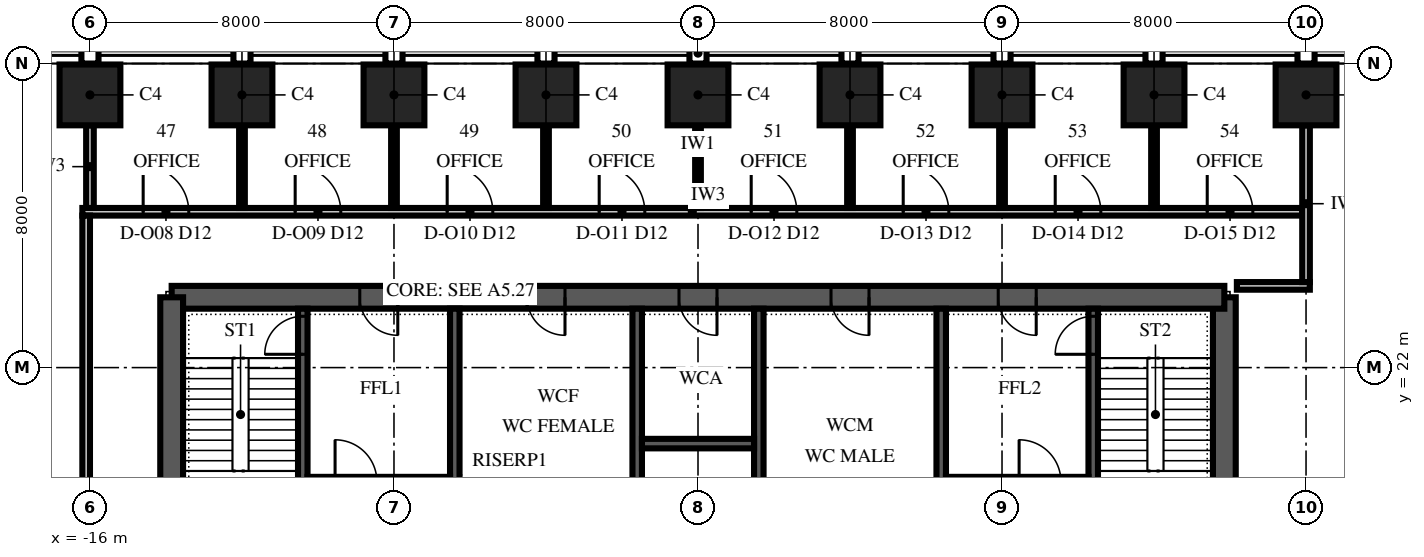
"""IFC4 building model, lengths in metres.
Left out: names, types, materials, properties, quantities, classifications, styles, units other than length and angle.
Written with IfcOpenShell. Run it as: python <this file> out.ifc"""

import sys

from ifc_helpers import new_model, si_unit, direction, frame, frame_2d, origin, origin_2d, place, context, subcontext, project, spatial, polyline, rectangle, outline, extrude, element, fill, save


model = new_model("IFC4")
c1 = context("Model", 3, precision=1e-05, world=origin(), true_north=direction((0.0, 1.0)))
c2 = subcontext(c1, "Body", "Model", "MODEL_VIEW")
j1 = project(units=[si_unit("LENGTHUNIT", "METRE"), si_unit("PLANEANGLEUNIT", "RADIAN")], contexts=[c1])
p1 = place(None, origin())
s1 = spatial("IfcSite", under=j1, at=p1, CompositionType="ELEMENT")
p2 = place(p1, origin())
s2 = spatial("IfcBuilding", under=s1, at=p2, CompositionType="ELEMENT")
p3 = place(p2, frame((0.0, 0.0, 182.0)))
s3 = spatial("IfcBuildingStorey", under=s2, at=p3, CompositionType="ELEMENT", Elevation=182.0)
for number, where, z_axis, x_axis in (
    (1, (16.0, 29.175, 0.0), (0.0, 0.0, 1.0), (-1.0, 0.0, 0.0)),
    (2, (12.0, 29.175, 0.0), (0.0, 0.0, 1.0), (-1.0, 0.0, 0.0)),
    (3, (8.0, 29.175, 0.0), (0.0, 0.0, 1.0), (-1.0, 0.0, 0.0)),
    (4, (4.0, 29.175, 0.0), (0.0, 0.0, 1.0), (-1.0, 0.0, 0.0)),
    (5, (0.0, 29.175, 0.0), (0.0, 0.0, 1.0), (-1.0, 0.0, 0.0)),
    (6, (-4.0, 29.175, 0.0), (0.0, 0.0, 1.0), (-1.0, 0.0, 0.0)),
    (7, (-8.0, 29.175, 0.0), (0.0, 0.0, 1.0), (-1.0, 0.0, 0.0)),
    (8, (-12.0, 29.175, 0.0), (0.0, 0.0, 1.0), (-1.0, 0.0, 0.0)),
    (9, (-16.0, 29.175, 0.0), (0.0, 0.0, 1.0), (-1.0, 0.0, 0.0)),
):
    element("IfcColumn", number, at=place(p3, frame(where, z_axis=z_axis, x_axis=x_axis)), inside=s3, PredefinedType="COLUMN", context=c2, shape_type="SweptSolid", body=[
        extrude(rectangle(XDim=1.6, YDim=1.6, at=origin_2d()), origin(), (0.0, 0.0, 1.0), 4.0),
    ])
p4 = place(p3, frame((13.85, 6.15, 0.0), z_axis=(0.0, 0.0, 1.0), x_axis=(0.0, 1.0, 0.0)))
e10 = element("IfcWall", 10, at=p4, inside=s3, PredefinedType="SHEAR", context=c2, shape_type="SweptSolid", body=[
    extrude(outline(polyline([(0.0, -0.3), (17.7, -0.3), (17.7, 0.0), (17.4, 0.0), (17.4, 0.3), (0.3, 0.3), (0.3, 0.0), (0.0, 0.0), (0.0, -0.3)])), origin(), (0.0, 0.0, 1.0), 4.0),
])
p5 = place(p4, frame((4.15, 0.0, 0.0)))
e11 = element("IfcOpeningElement", 11, at=p5, cuts=e10, PredefinedType="OPENING", context=c2, shape_type="SweptSolid", body=[
    extrude(rectangle(XDim=1.8, YDim=2.4, at=frame_2d((0.9, 1.2))), frame((0.0, 0.315, 0.0), z_axis=(0.0, -1.0, 0.0), x_axis=(1.0, 0.0, 0.0)), (0.0, 0.0, 1.0), 0.63),
])
p6 = place(p3, frame((13.85, 23.85, 0.0), z_axis=(0.0, 0.0, 1.0), x_axis=(-1.0, 0.0, 0.0)))
e12 = element("IfcWall", 12, at=p6, inside=s3, PredefinedType="SHEAR", context=c2, shape_type="SweptSolid", body=[
    extrude(rectangle(XDim=27.7, YDim=0.6, at=frame_2d((13.85, 0.0))), origin(), (0.0, 0.0, 1.0), 4.0),
])
p7 = place(p6, frame((21.75, 0.0, 0.0)))
e13 = element("IfcOpeningElement", 13, at=p7, cuts=e12, PredefinedType="OPENING", context=c2, shape_type="SweptSolid", body=[
    extrude(rectangle(XDim=1.0, YDim=2.1, at=frame_2d((0.5, 1.05))), frame((0.0, 0.315, 0.0), z_axis=(0.0, -1.0, 0.0), x_axis=(1.0, 0.0, 0.0)), (0.0, 0.0, 1.0), 0.63),
])
p8 = place(p6, frame((4.95, 0.0, 0.0)))
e14 = element("IfcOpeningElement", 14, at=p8, cuts=e12, PredefinedType="OPENING", context=c2, shape_type="SweptSolid", body=[
    extrude(rectangle(XDim=1.0, YDim=2.1, at=frame_2d((0.5, 1.05))), frame((0.0, 0.315, 0.0), z_axis=(0.0, -1.0, 0.0), x_axis=(1.0, 0.0, 0.0)), (0.0, 0.0, 1.0), 0.63),
])
p9 = place(p6, frame((17.35, 0.0, 0.0)))
e15 = element("IfcOpeningElement", 15, at=p9, cuts=e12, PredefinedType="OPENING", context=c2, shape_type="SweptSolid", body=[
    extrude(rectangle(XDim=1.0, YDim=2.1, at=frame_2d((0.5, 1.05))), frame((0.0, 0.315, 0.0), z_axis=(0.0, -1.0, 0.0), x_axis=(1.0, 0.0, 0.0)), (0.0, 0.0, 1.0), 0.63),
])
p10 = place(p6, frame((13.35, 0.0, 0.0)))
e16 = element("IfcOpeningElement", 16, at=p10, cuts=e12, PredefinedType="OPENING", context=c2, shape_type="SweptSolid", body=[
    extrude(rectangle(XDim=1.0, YDim=2.1, at=frame_2d((0.5, 1.05))), frame((0.0, 0.315, 0.0), z_axis=(0.0, -1.0, 0.0), x_axis=(1.0, 0.0, 0.0)), (0.0, 0.0, 1.0), 0.63),
])
p11 = place(p6, frame((9.35, 0.0, 0.0)))
e17 = element("IfcOpeningElement", 17, at=p11, cuts=e12, PredefinedType="OPENING", context=c2, shape_type="SweptSolid", body=[
    extrude(rectangle(XDim=1.0, YDim=2.1, at=frame_2d((0.5, 1.05))), frame((0.0, 0.315, 0.0), z_axis=(0.0, -1.0, 0.0), x_axis=(1.0, 0.0, 0.0)), (0.0, 0.0, 1.0), 0.63),
])
p12 = place(p3, frame((-13.85, 23.85, 0.0), z_axis=(0.0, 0.0, 1.0), x_axis=(0.0, -1.0, 0.0)))
e18 = element("IfcWall", 18, at=p12, inside=s3, PredefinedType="SHEAR", context=c2, shape_type="SweptSolid", body=[
    extrude(outline(polyline([(0.0, -0.3), (17.7, -0.3), (17.7, 0.0), (17.4, 0.0), (17.4, 0.3), (0.3, 0.3), (0.3, 0.0), (0.0, 0.0), (0.0, -0.3)])), origin(), (0.0, 0.0, 1.0), 4.0),
])
p13 = place(p12, frame((11.75, 0.0, 0.0)))
e19 = element("IfcOpeningElement", 19, at=p13, cuts=e18, PredefinedType="OPENING", context=c2, shape_type="SweptSolid", body=[
    extrude(rectangle(XDim=1.8, YDim=2.4, at=frame_2d((0.9, 1.2))), frame((0.0, 0.315, 0.0), z_axis=(0.0, -1.0, 0.0), x_axis=(1.0, 0.0, 0.0)), (0.0, 0.0, 1.0), 0.63),
])
p14 = place(p3, frame((-10.4, 16.125, 0.0), z_axis=(0.0, 0.0, 1.0), x_axis=(0.0, 1.0, 0.0)))
e20 = element("IfcWall", 20, at=p14, inside=s3, PredefinedType="SHEAR", context=c2, shape_type="SweptSolid", body=[
    extrude(rectangle(XDim=7.425, YDim=0.25, at=frame_2d((3.712, 0.0))), origin(), (0.0, 0.0, 1.0), 4.0),
])
p15 = place(p14, frame((6.225, 0.0, 0.0)))
e21 = element("IfcOpeningElement", 21, at=p15, cuts=e20, PredefinedType="OPENING", context=c2, shape_type="SweptSolid", body=[
    extrude(rectangle(XDim=1.0, YDim=2.1, at=frame_2d((0.5, 1.05))), frame((0.0, 0.14, 0.0), z_axis=(0.0, -1.0, 0.0), x_axis=(1.0, 0.0, 0.0)), (0.0, 0.0, 1.0), 0.28),
])
for number, where, z_axis, x_axis in (
    (22, (-6.4, 16.125, 0.0), (0.0, 0.0, 1.0), (0.0, 1.0, 0.0)),
    (23, (-1.6, 16.125, 0.0), (0.0, 0.0, 1.0), (0.0, 1.0, 0.0)),
    (24, (1.6, 16.125, 0.0), (0.0, 0.0, 1.0), (0.0, 1.0, 0.0)),
    (25, (6.4, 16.125, 0.0), (0.0, 0.0, 1.0), (0.0, 1.0, 0.0)),
):
    element("IfcWall", number, at=place(p3, frame(where, z_axis=z_axis, x_axis=x_axis)), inside=s3, PredefinedType="SHEAR", context=c2, shape_type="SweptSolid", body=[
        extrude(rectangle(XDim=7.425, YDim=0.25, at=frame_2d((3.712, 0.0))), origin(), (0.0, 0.0, 1.0), 4.0),
    ])
p16 = place(p3, frame((10.4, 16.125, 0.0), z_axis=(0.0, 0.0, 1.0), x_axis=(0.0, 1.0, 0.0)))
e26 = element("IfcWall", 26, at=p16, inside=s3, PredefinedType="SHEAR", context=c2, shape_type="SweptSolid", body=[
    extrude(rectangle(XDim=7.425, YDim=0.25, at=frame_2d((3.712, 0.0))), origin(), (0.0, 0.0, 1.0), 4.0),
])
p17 = place(p16, frame((6.225, 0.0, 0.0)))
e27 = element("IfcOpeningElement", 27, at=p17, cuts=e26, PredefinedType="OPENING", context=c2, shape_type="SweptSolid", body=[
    extrude(rectangle(XDim=1.0, YDim=2.1, at=frame_2d((0.5, 1.05))), frame((0.0, 0.14, 0.0), z_axis=(0.0, -1.0, 0.0), x_axis=(1.0, 0.0, 0.0)), (0.0, 0.0, 1.0), 0.28),
])
p18 = place(p3, frame((-1.475, 20.0, 0.0), z_axis=(0.0, 0.0, 1.0), x_axis=(1.0, 0.0, 0.0)))
e28 = element("IfcWall", 28, at=p18, inside=s3, PredefinedType="SHEAR", context=c2, shape_type="SweptSolid", body=[
    extrude(rectangle(XDim=2.95, YDim=0.25, at=frame_2d((1.475, 0.0))), origin(), (0.0, 0.0, 1.0), 4.0),
])
p19 = place(p3, frame((14.18, 24.15, 0.0), z_axis=(0.0, 0.0, 1.0), x_axis=(1.0, 0.0, 0.0)))
e29 = element("IfcWall", 29, at=p19, inside=s3, PredefinedType="PARTITIONING", context=c2, shape_type="SweptSolid", body=[
    extrude(rectangle(XDim=1.92, YDim=0.2, at=frame_2d((0.96, 0.0))), origin(), (0.0, 0.0, 1.0), 3.4),
])
p20 = place(p3, frame((-16.2, 26.1, 0.0), z_axis=(0.0, 0.0, 1.0), x_axis=(1.0, 0.0, 0.0)))
e30 = element("IfcWall", 30, at=p20, inside=s3, PredefinedType="PARTITIONING", context=c2, shape_type="SweptSolid", body=[
    extrude(rectangle(XDim=32.1, YDim=0.2, at=frame_2d((16.05, 0.0))), origin(), (0.0, 0.0, 1.0), 3.4),
])
p21 = place(p20, frame((1.6, 0.0, 0.0)))
e31 = element("IfcOpeningElement", 31, at=p21, cuts=e30, PredefinedType="OPENING", context=c2, shape_type="SweptSolid", body=[
    extrude(rectangle(XDim=1.2, YDim=2.4, at=frame_2d((0.6, 1.2))), frame((0.0, 0.115, 0.0), z_axis=(0.0, -1.0, 0.0), x_axis=(1.0, 0.0, 0.0)), (0.0, 0.0, 1.0), 0.23),
])
p22 = place(p20, frame((5.6, 0.0, 0.0)))
e32 = element("IfcOpeningElement", 32, at=p22, cuts=e30, PredefinedType="OPENING", context=c2, shape_type="SweptSolid", body=[
    extrude(rectangle(XDim=1.2, YDim=2.4, at=frame_2d((0.6, 1.2))), frame((0.0, 0.115, 0.0), z_axis=(0.0, -1.0, 0.0), x_axis=(1.0, 0.0, 0.0)), (0.0, 0.0, 1.0), 0.23),
])
p23 = place(p20, frame((9.6, 0.0, 0.0)))
e33 = element("IfcOpeningElement", 33, at=p23, cuts=e30, PredefinedType="OPENING", context=c2, shape_type="SweptSolid", body=[
    extrude(rectangle(XDim=1.2, YDim=2.4, at=frame_2d((0.6, 1.2))), frame((0.0, 0.115, 0.0), z_axis=(0.0, -1.0, 0.0), x_axis=(1.0, 0.0, 0.0)), (0.0, 0.0, 1.0), 0.23),
])
p24 = place(p20, frame((13.6, 0.0, 0.0)))
e34 = element("IfcOpeningElement", 34, at=p24, cuts=e30, PredefinedType="OPENING", context=c2, shape_type="SweptSolid", body=[
    extrude(rectangle(XDim=1.2, YDim=2.4, at=frame_2d((0.6, 1.2))), frame((0.0, 0.115, 0.0), z_axis=(0.0, -1.0, 0.0), x_axis=(1.0, 0.0, 0.0)), (0.0, 0.0, 1.0), 0.23),
])
p25 = place(p20, frame((17.6, 0.0, 0.0)))
e35 = element("IfcOpeningElement", 35, at=p25, cuts=e30, PredefinedType="OPENING", context=c2, shape_type="SweptSolid", body=[
    extrude(rectangle(XDim=1.2, YDim=2.4, at=frame_2d((0.6, 1.2))), frame((0.0, 0.115, 0.0), z_axis=(0.0, -1.0, 0.0), x_axis=(1.0, 0.0, 0.0)), (0.0, 0.0, 1.0), 0.23),
])
p26 = place(p20, frame((21.6, 0.0, 0.0)))
e36 = element("IfcOpeningElement", 36, at=p26, cuts=e30, PredefinedType="OPENING", context=c2, shape_type="SweptSolid", body=[
    extrude(rectangle(XDim=1.2, YDim=2.4, at=frame_2d((0.6, 1.2))), frame((0.0, 0.115, 0.0), z_axis=(0.0, -1.0, 0.0), x_axis=(1.0, 0.0, 0.0)), (0.0, 0.0, 1.0), 0.23),
])
p27 = place(p20, frame((25.6, 0.0, 0.0)))
e37 = element("IfcOpeningElement", 37, at=p27, cuts=e30, PredefinedType="OPENING", context=c2, shape_type="SweptSolid", body=[
    extrude(rectangle(XDim=1.2, YDim=2.4, at=frame_2d((0.6, 1.2))), frame((0.0, 0.115, 0.0), z_axis=(0.0, -1.0, 0.0), x_axis=(1.0, 0.0, 0.0)), (0.0, 0.0, 1.0), 0.23),
])
p28 = place(p20, frame((29.6, 0.0, 0.0)))
e38 = element("IfcOpeningElement", 38, at=p28, cuts=e30, PredefinedType="OPENING", context=c2, shape_type="SweptSolid", body=[
    extrude(rectangle(XDim=1.2, YDim=2.4, at=frame_2d((0.6, 1.2))), frame((0.0, 0.115, 0.0), z_axis=(0.0, -1.0, 0.0), x_axis=(1.0, 0.0, 0.0)), (0.0, 0.0, 1.0), 0.23),
])
p29 = place(p3, frame((-16.1, 9.9, 0.0), z_axis=(0.0, 0.0, 1.0), x_axis=(0.0, 1.0, 0.0)))
e39 = element("IfcWall", 39, at=p29, inside=s3, PredefinedType="PARTITIONING", context=c2, shape_type="SweptSolid", body=[
    extrude(rectangle(XDim=16.1, YDim=0.2, at=frame_2d((8.05, 0.0))), origin(), (0.0, 0.0, 1.0), 3.25),
])
p30 = place(p29, frame((7.88, 0.0, 0.0)))
e40 = element("IfcOpeningElement", 40, at=p30, cuts=e39, PredefinedType="OPENING", context=c2, shape_type="SweptSolid", body=[
    extrude(rectangle(XDim=1.2, YDim=2.4, at=frame_2d((0.6, 1.2))), frame((0.0, 0.115, 0.0), z_axis=(0.0, -1.0, 0.0), x_axis=(1.0, 0.0, 0.0)), (0.0, 0.0, 1.0), 0.23),
])
p31 = place(p3, frame((-16.0, 26.2, 0.0), z_axis=(0.0, 0.0, 1.0), x_axis=(0.0, 1.0, 0.0)))
e41 = element("IfcWall", 41, at=p31, inside=s3, PredefinedType="PARTITIONING", context=c2, shape_type="SweptSolid", body=[
    extrude(rectangle(XDim=2.175, YDim=0.2, at=frame_2d((1.087, 0.0))), origin(), (0.0, 0.0, 1.0), 3.4),
])
for number, where, z_axis, x_axis in (
    (42, (-12.0, 26.2, 0.0), (0.0, 0.0, 1.0), (0.0, 1.0, 0.0)),
    (43, (-8.0, 26.2, 0.0), (0.0, 0.0, 1.0), (0.0, 1.0, 0.0)),
):
    element("IfcWall", number, at=place(p3, frame(where, z_axis=z_axis, x_axis=x_axis)), inside=s3, PredefinedType="PARTITIONING", context=c2, shape_type="SweptSolid", body=[
        extrude(rectangle(XDim=2.175, YDim=0.15, at=frame_2d((1.087, 0.0))), origin(), (0.0, 0.0, 1.0), 3.4),
    ])
p32 = place(p3, frame((-4.0, 26.2, 0.0), z_axis=(0.0, 0.0, 1.0), x_axis=(0.0, 1.0, 0.0)))
e44 = element("IfcWall", 44, at=p32, inside=s3, PredefinedType="PARTITIONING", context=c2, shape_type="SweptSolid", body=[
    extrude(rectangle(XDim=2.175, YDim=0.15, at=frame_2d((1.087, 0.0))), origin(), (0.0, 0.0, 1.0), 3.85),
])
p33 = place(p3, frame((0.0, 26.2, 0.0), z_axis=(0.0, 0.0, 1.0), x_axis=(0.0, 1.0, 0.0)))
e45 = element("IfcWall", 45, at=p33, inside=s3, PredefinedType="PARTITIONING", context=c2, shape_type="SweptSolid", body=[
    extrude(rectangle(XDim=2.175, YDim=0.15, at=frame_2d((1.087, 0.0))), origin(), (0.0, 0.0, 1.0), 3.4),
])
p34 = place(p3, frame((4.0, 26.2, 0.0), z_axis=(0.0, 0.0, 1.0), x_axis=(0.0, 1.0, 0.0)))
e46 = element("IfcWall", 46, at=p34, inside=s3, PredefinedType="PARTITIONING", context=c2, shape_type="SweptSolid", body=[
    extrude(rectangle(XDim=2.175, YDim=0.15, at=frame_2d((1.087, 0.0))), origin(), (0.0, 0.0, 1.0), 3.85),
])
for number, where, z_axis, x_axis in (
    (47, (8.0, 26.2, 0.0), (0.0, 0.0, 1.0), (0.0, 1.0, 0.0)),
    (48, (12.0, 26.2, 0.0), (0.0, 0.0, 1.0), (0.0, 1.0, 0.0)),
):
    element("IfcWall", number, at=place(p3, frame(where, z_axis=z_axis, x_axis=x_axis)), inside=s3, PredefinedType="PARTITIONING", context=c2, shape_type="SweptSolid", body=[
        extrude(rectangle(XDim=2.175, YDim=0.15, at=frame_2d((1.087, 0.0))), origin(), (0.0, 0.0, 1.0), 3.4),
    ])
p35 = place(p3, frame((16.0, 24.25, 0.0), z_axis=(0.0, 0.0, 1.0), x_axis=(0.0, 1.0, 0.0)))
e49 = element("IfcWall", 49, at=p35, inside=s3, PredefinedType="PARTITIONING", context=c2, shape_type="SweptSolid", body=[
    extrude(rectangle(XDim=4.125, YDim=0.2, at=frame_2d((2.062, 0.0))), origin(), (0.0, 0.0, 1.0), 3.4),
])
p36 = place(p7, origin())
e50 = element("IfcDoor", 50, at=p36, inside=s3, OperationType="SINGLE_SWING_RIGHT", PredefinedType="DOOR", context=c2, shape_type="SweptSolid", body=[
    extrude(rectangle(XDim=1.0, YDim=2.1, at=frame_2d((0.5, 1.05))), frame((0.0, 0.3, 0.0), z_axis=(0.0, -1.0, 0.0), x_axis=(1.0, 0.0, 0.0)), (0.0, 0.0, 1.0), 0.6),
])
fill(e13, e50)
p37 = place(p8, origin())
e51 = element("IfcDoor", 51, at=p37, inside=s3, OperationType="SINGLE_SWING_RIGHT", PredefinedType="DOOR", context=c2, shape_type="SweptSolid", body=[
    extrude(rectangle(XDim=1.0, YDim=2.1, at=frame_2d((0.5, 1.05))), frame((0.0, 0.3, 0.0), z_axis=(0.0, -1.0, 0.0), x_axis=(1.0, 0.0, 0.0)), (0.0, 0.0, 1.0), 0.6),
])
fill(e14, e51)
p38 = place(p9, origin())
e52 = element("IfcDoor", 52, at=p38, inside=s3, OperationType="SINGLE_SWING_LEFT", PredefinedType="DOOR", context=c2, shape_type="SweptSolid", body=[
    extrude(rectangle(XDim=1.0, YDim=2.1, at=frame_2d((0.5, 1.05))), frame((0.0, 0.3, 0.0), z_axis=(0.0, -1.0, 0.0), x_axis=(1.0, 0.0, 0.0)), (0.0, 0.0, 1.0), 0.6),
])
fill(e15, e52)
p39 = place(p10, origin())
e53 = element("IfcDoor", 53, at=p39, inside=s3, OperationType="SINGLE_SWING_LEFT", PredefinedType="DOOR", context=c2, shape_type="SweptSolid", body=[
    extrude(rectangle(XDim=1.0, YDim=2.1, at=frame_2d((0.5, 1.05))), frame((0.0, 0.3, 0.0), z_axis=(0.0, -1.0, 0.0), x_axis=(1.0, 0.0, 0.0)), (0.0, 0.0, 1.0), 0.6),
])
fill(e16, e53)
p40 = place(p11, origin())
e54 = element("IfcDoor", 54, at=p40, inside=s3, OperationType="SINGLE_SWING_LEFT", PredefinedType="DOOR", context=c2, shape_type="SweptSolid", body=[
    extrude(rectangle(XDim=1.0, YDim=2.1, at=frame_2d((0.5, 1.05))), frame((0.0, 0.3, 0.0), z_axis=(0.0, -1.0, 0.0), x_axis=(1.0, 0.0, 0.0)), (0.0, 0.0, 1.0), 0.6),
])
fill(e17, e54)
p41 = place(p15, origin())
e55 = element("IfcDoor", 55, at=p41, inside=s3, OperationType="SINGLE_SWING_LEFT", PredefinedType="DOOR", context=c2, shape_type="SweptSolid", body=[
    extrude(rectangle(XDim=1.0, YDim=2.1, at=frame_2d((0.5, 1.05))), frame((0.0, 0.125, 0.0), z_axis=(0.0, -1.0, 0.0), x_axis=(1.0, 0.0, 0.0)), (0.0, 0.0, 1.0), 0.25),
])
fill(e21, e55)
p42 = place(p17, origin())
e56 = element("IfcDoor", 56, at=p42, inside=s3, OperationType="SINGLE_SWING_LEFT", PredefinedType="DOOR", context=c2, shape_type="SweptSolid", body=[
    extrude(rectangle(XDim=1.0, YDim=2.1, at=frame_2d((0.5, 1.05))), frame((0.0, 0.125, 0.0), z_axis=(0.0, -1.0, 0.0), x_axis=(1.0, 0.0, 0.0)), (0.0, 0.0, 1.0), 0.25),
])
fill(e27, e56)
p43 = place(p21, origin())
e57 = element("IfcDoor", 57, at=p43, inside=s3, OperationType="SINGLE_SWING_LEFT", PredefinedType="DOOR", context=c2, shape_type="SweptSolid", body=[
    extrude(rectangle(XDim=1.2, YDim=2.4, at=frame_2d((0.6, 1.2))), frame((0.0, 0.1, 0.0), z_axis=(0.0, -1.0, 0.0), x_axis=(1.0, 0.0, 0.0)), (0.0, 0.0, 1.0), 0.199),
])
fill(e31, e57)
p44 = place(p22, origin())
e58 = element("IfcDoor", 58, at=p44, inside=s3, OperationType="SINGLE_SWING_LEFT", PredefinedType="DOOR", context=c2, shape_type="SweptSolid", body=[
    extrude(rectangle(XDim=1.2, YDim=2.4, at=frame_2d((0.6, 1.2))), frame((0.0, 0.1, 0.0), z_axis=(0.0, -1.0, 0.0), x_axis=(1.0, 0.0, 0.0)), (0.0, 0.0, 1.0), 0.199),
])
fill(e32, e58)
p45 = place(p23, origin())
e59 = element("IfcDoor", 59, at=p45, inside=s3, OperationType="SINGLE_SWING_LEFT", PredefinedType="DOOR", context=c2, shape_type="SweptSolid", body=[
    extrude(rectangle(XDim=1.2, YDim=2.4, at=frame_2d((0.6, 1.2))), frame((0.0, 0.1, 0.0), z_axis=(0.0, -1.0, 0.0), x_axis=(1.0, 0.0, 0.0)), (0.0, 0.0, 1.0), 0.199),
])
fill(e33, e59)
p46 = place(p24, origin())
e60 = element("IfcDoor", 60, at=p46, inside=s3, OperationType="SINGLE_SWING_LEFT", PredefinedType="DOOR", context=c2, shape_type="SweptSolid", body=[
    extrude(rectangle(XDim=1.2, YDim=2.4, at=frame_2d((0.6, 1.2))), frame((0.0, 0.1, 0.0), z_axis=(0.0, -1.0, 0.0), x_axis=(1.0, 0.0, 0.0)), (0.0, 0.0, 1.0), 0.199),
])
fill(e34, e60)
p47 = place(p25, origin())
e61 = element("IfcDoor", 61, at=p47, inside=s3, OperationType="SINGLE_SWING_LEFT", PredefinedType="DOOR", context=c2, shape_type="SweptSolid", body=[
    extrude(rectangle(XDim=1.2, YDim=2.4, at=frame_2d((0.6, 1.2))), frame((0.0, 0.1, 0.0), z_axis=(0.0, -1.0, 0.0), x_axis=(1.0, 0.0, 0.0)), (0.0, 0.0, 1.0), 0.199),
])
fill(e35, e61)
p48 = place(p26, origin())
e62 = element("IfcDoor", 62, at=p48, inside=s3, OperationType="SINGLE_SWING_LEFT", PredefinedType="DOOR", context=c2, shape_type="SweptSolid", body=[
    extrude(rectangle(XDim=1.2, YDim=2.4, at=frame_2d((0.6, 1.2))), frame((0.0, 0.1, 0.0), z_axis=(0.0, -1.0, 0.0), x_axis=(1.0, 0.0, 0.0)), (0.0, 0.0, 1.0), 0.199),
])
fill(e36, e62)
p49 = place(p27, origin())
e63 = element("IfcDoor", 63, at=p49, inside=s3, OperationType="SINGLE_SWING_LEFT", PredefinedType="DOOR", context=c2, shape_type="SweptSolid", body=[
    extrude(rectangle(XDim=1.2, YDim=2.4, at=frame_2d((0.6, 1.2))), frame((0.0, 0.1, 0.0), z_axis=(0.0, -1.0, 0.0), x_axis=(1.0, 0.0, 0.0)), (0.0, 0.0, 1.0), 0.199),
])
fill(e37, e63)
p50 = place(p28, origin())
e64 = element("IfcDoor", 64, at=p50, inside=s3, OperationType="SINGLE_SWING_LEFT", PredefinedType="DOOR", context=c2, shape_type="SweptSolid", body=[
    extrude(rectangle(XDim=1.2, YDim=2.4, at=frame_2d((0.6, 1.2))), frame((0.0, 0.1, 0.0), z_axis=(0.0, -1.0, 0.0), x_axis=(1.0, 0.0, 0.0)), (0.0, 0.0, 1.0), 0.199),
])
fill(e38, e64)
save(model, sys.argv[1])
